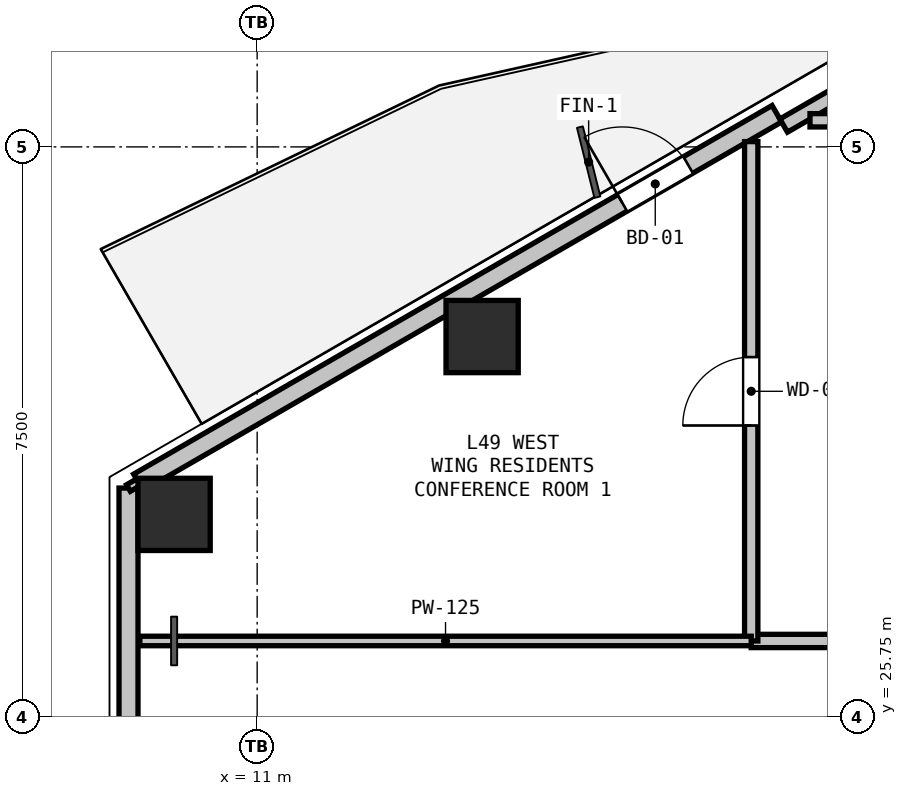
"""IFC4 building model, lengths in metres.
Left out: names, types, materials, properties, quantities, classifications, styles, units other than length and angle.
Written with IfcOpenShell. Run it as: python <this file> out.ifc"""

import sys

from ifc_helpers import new_model, si_unit, direction, frame, frame_2d, origin, origin_2d, place, context, subcontext, project, spatial, rectangle, hollow_rectangle, extrude, element, fill, save


model = new_model("IFC4")
c1 = context("Model", 3, precision=1e-05, world=origin(), true_north=direction((0.0, 1.0)))
c2 = subcontext(c1, "Body", "Model", "MODEL_VIEW")
j1 = project(units=[si_unit("LENGTHUNIT", "METRE"), si_unit("PLANEANGLEUNIT", "RADIAN")], contexts=[c1])
p1 = place(None, origin())
s1 = spatial("IfcSite", under=j1, at=p1, CompositionType="ELEMENT")
p2 = place(p1, origin())
s2 = spatial("IfcBuilding", under=s1, at=p2, CompositionType="ELEMENT")
p3 = place(p2, frame((0.0, 0.0, 178.8)))
s3 = spatial("IfcBuildingStorey", under=s2, at=p3, CompositionType="ELEMENT", Elevation=178.8)
for number, where, z_axis, x_axis in (
    (1, (9.907, 28.415, 0.0), (0.0, 0.0, 1.0), (1.0, 0.0, 0.0)),
    (2, (13.96, 30.755, 0.0), (0.0, 0.0, 1.0), (1.0, 0.0, 0.0)),
):
    element("IfcColumn", number, at=place(p3, frame(where, z_axis=z_axis, x_axis=x_axis)), inside=s3, PredefinedType="COLUMN", context=c2, shape_type="SweptSolid", body=[
        extrude(hollow_rectangle(XDim=0.95, YDim=0.95, WallThickness=0.028, at=origin_2d()), origin(), (0.0, 0.0, 1.0), 3.3),
    ])
p4 = place(p3, frame((9.308, 24.738, 0.0), z_axis=(0.0, 0.0, 1.0), x_axis=(0.0, 1.0, 0.0)))
e3 = element("IfcWall", 3, at=p4, inside=s3, PredefinedType="SOLIDWALL", context=c2, shape_type="SweptSolid", body=[
    extrude(rectangle(XDim=4.023, YDim=0.25, at=frame_2d((2.012, 0.0))), origin(), (0.0, 0.0, 1.0), 2.69),
])
p5 = place(p3, frame((9.438, 28.837, 0.0), z_axis=(0.0, 0.0, 1.0), x_axis=(0.866027133173, 0.499997004599, 0.0)))
e4 = element("IfcWall", 4, at=p5, inside=s3, PredefinedType="SOLIDWALL", context=c2, shape_type="SweptSolid", body=[
    extrude(rectangle(XDim=9.699, YDim=0.25, at=frame_2d((4.849, 0.0))), origin(), (0.0, 0.0, 1.0), 2.69),
])
p6 = place(p5, frame((7.352, 0.0, 0.0)))
e5 = element("IfcOpeningElement", 5, at=p6, cuts=e4, PredefinedType="OPENING", context=c2, shape_type="SweptSolid", body=[
    extrude(rectangle(XDim=1.0, YDim=2.1, at=frame_2d((0.5, 1.05))), frame((0.0, 0.135, 0.0), z_axis=(0.0, -1.0, 0.0), x_axis=(1.0, 0.0, 0.0)), (0.0, 0.0, 1.0), 0.27),
])
p7 = place(p3, frame((17.927, 33.53, 0.0), z_axis=(0.0, 0.0, 1.0), x_axis=(0.86605165483, 0.499954529098, 0.0)))
e6 = element("IfcWall", 6, at=p7, inside=s3, PredefinedType="PARAPET", context=c2, shape_type="SweptSolid", body=[
    extrude(rectangle(XDim=1.7, YDim=0.2, at=frame_2d((0.85, 0.0))), origin(), (0.0, 0.0, 1.0), 2.69),
])
p8 = place(p3, frame((21.95, 26.75, 0.0), z_axis=(0.0, 0.0, 1.0), x_axis=(-1.0, 0.0, 0.0)))
e7 = element("IfcWall", 7, at=p8, inside=s3, PredefinedType="PLUMBINGWALL", context=c2, shape_type="SweptSolid", body=[
    extrude(rectangle(XDim=4.45, YDim=0.175, at=frame_2d((2.225, 0.0))), origin(), (0.0, 0.0, 1.0), 2.595),
])
p9 = place(p3, frame((17.5, 26.75, 0.0), z_axis=(0.0, 0.0, 1.0), x_axis=(0.0, 1.0, 0.0)))
e8 = element("IfcWall", 8, at=p9, inside=s3, PredefinedType="PLUMBINGWALL", context=c2, shape_type="SweptSolid", body=[
    extrude(rectangle(XDim=6.57, YDim=0.175, at=frame_2d((3.285, 0.0))), origin(), (0.0, 0.0, 1.0), 2.365),
])
p10 = place(p9, frame((2.835, 0.0, 0.0)))
e9 = element("IfcOpeningElement", 9, at=p10, cuts=e8, PredefinedType="OPENING", context=c2, shape_type="SweptSolid", body=[
    extrude(rectangle(XDim=0.9, YDim=2.1, at=frame_2d((0.45, 1.05))), frame((0.0, 0.097, 0.0), z_axis=(0.0, -1.0, 0.0), x_axis=(1.0, 0.0, 0.0)), (0.0, 0.0, 1.0), 0.195),
])
p11 = place(p3, frame((18.273, 33.6, 0.0), z_axis=(0.0, 0.0, 1.0), x_axis=(1.0, 0.0, 0.0)))
e10 = element("IfcWall", 10, at=p11, inside=s3, PredefinedType="PLUMBINGWALL", context=c2, shape_type="SweptSolid", body=[
    extrude(rectangle(XDim=1.727, YDim=0.175, at=frame_2d((0.863, 0.0))), origin(), (0.0, 0.0, 1.0), 2.365),
])
p12 = place(p3, frame((17.5, 26.75, 0.0), z_axis=(0.0, 0.0, 1.0), x_axis=(-1.0, 0.0, 0.0)))
e11 = element("IfcWall", 11, at=p12, inside=s3, PredefinedType="PARTITIONING", context=c2, shape_type="SweptSolid", body=[
    extrude(rectangle(XDim=8.043, YDim=0.125, at=frame_2d((4.022, 0.0))), origin(), (0.0, 0.0, 1.0), 2.734),
])
p13 = place(p3, frame((9.307, 28.762, 0.0), z_axis=(0.0, 0.0, 1.0), x_axis=(0.865833797362, 0.500331725305, 0.0)))
e12 = element("IfcWall", 12, at=p13, inside=s3, PredefinedType="PARTITIONING", context=c2, shape_type="SweptSolid", body=[
    extrude(rectangle(XDim=0.15, YDim=0.1, at=frame_2d((0.075, 0.0))), origin(), (0.0, 0.0, 1.0), 3.07),
])
p14 = place(p6, origin())
e13 = element("IfcDoor", 13, at=p14, inside=s3, OperationType="SINGLE_SWING_LEFT", PredefinedType="DOOR", context=c2, shape_type="SweptSolid", body=[
    extrude(rectangle(XDim=1.0, YDim=2.1, at=frame_2d((0.5, 1.05))), frame((0.0, 0.025, 0.0), z_axis=(0.0, -1.0, 0.0), x_axis=(1.0, 0.0, 0.0)), (0.0, 0.0, 1.0), 0.05),
])
fill(e5, e13)
p15 = place(p10, origin())
e14 = element("IfcDoor", 14, at=p15, inside=s3, OperationType="SINGLE_SWING_LEFT", PredefinedType="DOOR", context=c2, shape_type="SweptSolid", body=[
    extrude(rectangle(XDim=0.9, YDim=2.1, at=frame_2d((0.45, 1.05))), frame((0.0, 0.025, 0.0), z_axis=(0.0, -1.0, 0.0), x_axis=(1.0, 0.0, 0.0)), (0.0, 0.0, 1.0), 0.05),
])
fill(e9, e14)
save(model, sys.argv[1])
